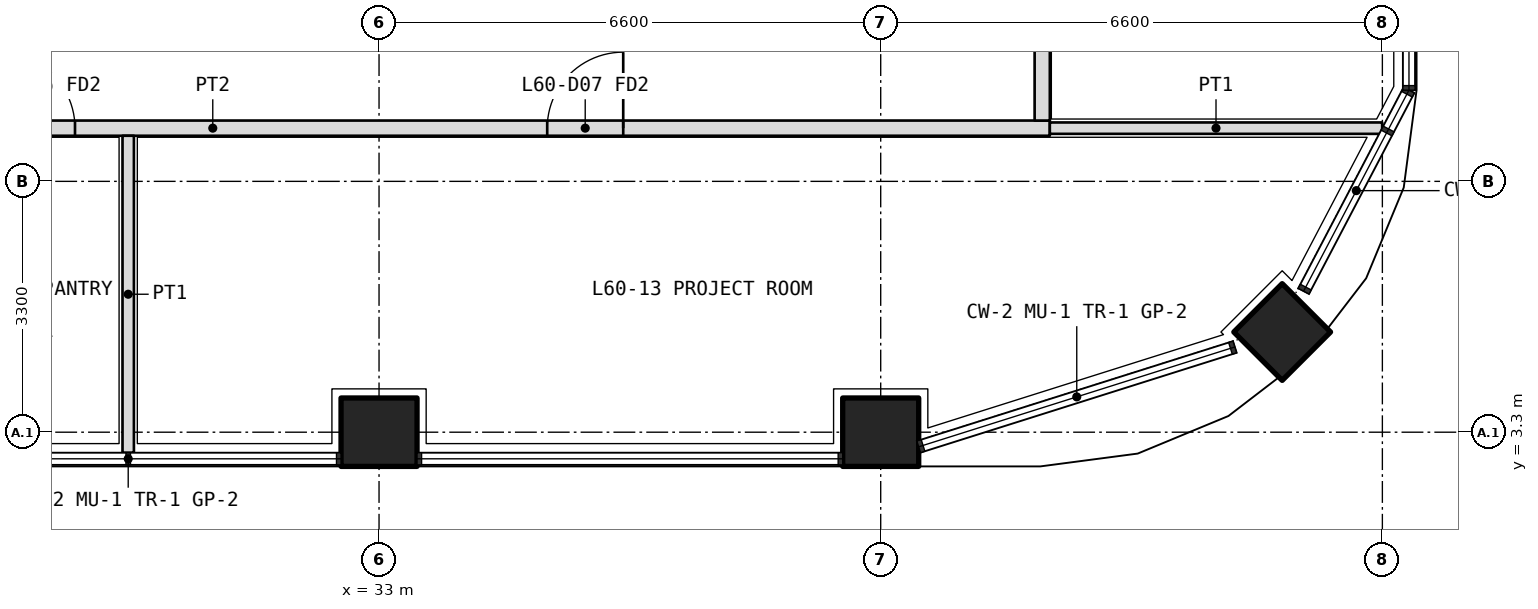
"""IFC4 building model, lengths in metres.
Left out: names, types, materials, properties, quantities, classifications, styles, units other than length and angle.
Written with IfcOpenShell. Run it as: python <this file> out.ifc"""

import sys

from ifc_helpers import new_model, si_unit, direction, frame, frame_2d, origin, origin_2d, place, context, subcontext, project, spatial, rectangle, extrude, element, fill, save


model = new_model("IFC4")
c1 = context("Model", 3, precision=1e-05, world=origin(), true_north=direction((0.0, 1.0)))
c2 = subcontext(c1, "Body", "Model", "MODEL_VIEW")
j1 = project(units=[si_unit("LENGTHUNIT", "METRE"), si_unit("PLANEANGLEUNIT", "RADIAN")], contexts=[c1])
p1 = place(None, origin())
s1 = spatial("IfcSite", under=j1, at=p1, CompositionType="ELEMENT")
p2 = place(p1, origin())
s2 = spatial("IfcBuilding", under=s1, at=p2, CompositionType="ELEMENT")
p3 = place(p2, frame((0.0, 0.0, 262.8)))
s3 = spatial("IfcBuildingStorey", under=s2, at=p3, CompositionType="ELEMENT", Elevation=262.8)
p4 = place(p3, frame((44.882, 4.618, 0.0), z_axis=(0.0, 0.0, 1.0), x_axis=(0.707106781187, 0.707106781187, 0.0)))
e1 = element("IfcColumn", 1, at=p4, inside=s3, PredefinedType="COLUMN", context=c2, shape_type="SweptSolid", body=[
    extrude(rectangle(XDim=0.9, YDim=0.9, at=origin_2d()), origin(), (0.0, 0.0, 1.0), 4.2),
])
for number, where, z_axis, x_axis in (
    (2, (33.0, 3.3, 0.0), (0.0, 0.0, 1.0), (1.0, 0.0, 0.0)),
    (3, (39.6, 3.3, 0.0), (0.0, 0.0, 1.0), (1.0, 0.0, 0.0)),
):
    element("IfcColumn", number, at=place(p3, frame(where, z_axis=z_axis, x_axis=x_axis)), inside=s3, PredefinedType="COLUMN", context=c2, shape_type="SweptSolid", body=[
        extrude(rectangle(XDim=1.0, YDim=0.9, at=origin_2d()), origin(), (0.0, 0.0, 1.0), 4.2),
    ])
p5 = place(p3, frame((19.8, 7.3, 0.0), z_axis=(0.0, 0.0, 1.0), x_axis=(1.0, 0.0, 0.0)))
e4 = element("IfcWall", 4, at=p5, inside=s3, PredefinedType="PARTITIONING", context=c2, shape_type="SweptSolid", body=[
    extrude(rectangle(XDim=22.025, YDim=0.2, at=frame_2d((11.012, 0.0))), origin(), (0.0, 0.0, 1.0), 3.0),
])
p6 = place(p5, frame((1.15, 0.0, 0.0)))
e5 = element("IfcOpeningElement", 5, at=p6, cuts=e4, PredefinedType="OPENING", context=c2, shape_type="SweptSolid", body=[
    extrude(rectangle(XDim=1.0, YDim=2.1, at=frame_2d((0.5, 1.05))), frame((0.0, 0.11, 0.0), z_axis=(0.0, -1.0, 0.0), x_axis=(1.0, 0.0, 0.0)), (0.0, 0.0, 1.0), 0.22),
])
p7 = place(p5, frame((4.9, 0.0, 0.0)))
e6 = element("IfcOpeningElement", 6, at=p7, cuts=e4, PredefinedType="OPENING", context=c2, shape_type="SweptSolid", body=[
    extrude(rectangle(XDim=1.0, YDim=2.1, at=frame_2d((0.5, 1.05))), frame((0.0, 0.11, 0.0), z_axis=(0.0, -1.0, 0.0), x_axis=(1.0, 0.0, 0.0)), (0.0, 0.0, 1.0), 0.22),
])
p8 = place(p5, frame((8.2, 0.0, 0.0)))
e7 = element("IfcOpeningElement", 7, at=p8, cuts=e4, PredefinedType="OPENING", context=c2, shape_type="SweptSolid", body=[
    extrude(rectangle(XDim=1.0, YDim=2.1, at=frame_2d((0.5, 1.05))), frame((0.0, 0.11, 0.0), z_axis=(0.0, -1.0, 0.0), x_axis=(1.0, 0.0, 0.0)), (0.0, 0.0, 1.0), 0.22),
])
p9 = place(p5, frame((15.413, 0.0, 0.0)))
e8 = element("IfcOpeningElement", 8, at=p9, cuts=e4, PredefinedType="OPENING", context=c2, shape_type="SweptSolid", body=[
    extrude(rectangle(XDim=1.0, YDim=2.1, at=frame_2d((0.5, 1.05))), frame((0.0, 0.11, 0.0), z_axis=(0.0, -1.0, 0.0), x_axis=(1.0, 0.0, 0.0)), (0.0, 0.0, 1.0), 0.22),
])
p10 = place(p3, frame((41.725, 7.4, 0.0), z_axis=(0.0, 0.0, 1.0), x_axis=(0.0, 1.0, 0.0)))
e9 = element("IfcWall", 9, at=p10, inside=s3, PredefinedType="PARTITIONING", context=c2, shape_type="SweptSolid", body=[
    extrude(rectangle(XDim=31.4, YDim=0.2, at=frame_2d((15.7, 0.0))), origin(), (0.0, 0.0, 1.0), 3.0),
])
p11 = place(p10, frame((5.65, 0.0, 0.0)))
e10 = element("IfcOpeningElement", 10, at=p11, cuts=e9, PredefinedType="OPENING", context=c2, shape_type="SweptSolid", body=[
    extrude(rectangle(XDim=1.0, YDim=2.1, at=frame_2d((0.5, 1.05))), frame((0.0, 0.11, 0.0), z_axis=(0.0, -1.0, 0.0), x_axis=(1.0, 0.0, 0.0)), (0.0, 0.0, 1.0), 0.22),
])
p12 = place(p10, frame((13.4, 0.0, 0.0)))
e11 = element("IfcOpeningElement", 11, at=p12, cuts=e9, PredefinedType="OPENING", context=c2, shape_type="SweptSolid", body=[
    extrude(rectangle(XDim=1.0, YDim=2.1, at=frame_2d((0.5, 1.05))), frame((0.0, 0.11, 0.0), z_axis=(0.0, -1.0, 0.0), x_axis=(1.0, 0.0, 0.0)), (0.0, 0.0, 1.0), 0.22),
])
p13 = place(p10, frame((16.75, 0.0, 0.0)))
e12 = element("IfcOpeningElement", 12, at=p13, cuts=e9, PredefinedType="OPENING", context=c2, shape_type="SweptSolid", body=[
    extrude(rectangle(XDim=0.9, YDim=2.1, at=frame_2d((0.45, 1.05))), frame((0.0, 0.11, 0.0), z_axis=(0.0, -1.0, 0.0), x_axis=(1.0, 0.0, 0.0)), (0.0, 0.0, 1.0), 0.22),
])
p14 = place(p10, frame((24.65, 0.0, 0.0)))
e13 = element("IfcOpeningElement", 13, at=p14, cuts=e9, PredefinedType="OPENING", context=c2, shape_type="SweptSolid", body=[
    extrude(rectangle(XDim=1.2, YDim=2.1, at=frame_2d((0.6, 1.05))), frame((0.0, 0.11, 0.0), z_axis=(0.0, -1.0, 0.0), x_axis=(1.0, 0.0, 0.0)), (0.0, 0.0, 1.0), 0.22),
])
p15 = place(p3, frame((46.198, 7.3, 0.0), z_axis=(0.0, 0.0, 1.0), x_axis=(-1.0, 0.0, 0.0)))
e14 = element("IfcWall", 14, at=p15, inside=s3, PredefinedType="PARTITIONING", context=c2, shape_type="SweptSolid", body=[
    extrude(rectangle(XDim=4.373, YDim=0.15, at=frame_2d((2.186, 0.0))), origin(), (0.0, 0.0, 1.0), 2.7),
])
p16 = place(p3, frame((29.7, 3.03, 0.0), z_axis=(0.0, 0.0, 1.0), x_axis=(0.0, 1.0, 0.0)))
e15 = element("IfcWall", 15, at=p16, inside=s3, PredefinedType="PARTITIONING", context=c2, shape_type="SweptSolid", body=[
    extrude(rectangle(XDim=4.17, YDim=0.15, at=frame_2d((2.085, 0.0))), origin(), (0.0, 0.0, 1.0), 2.7),
])
p17 = place(p8, origin())
e16 = element("IfcDoor", 16, at=p17, inside=s3, OperationType="SINGLE_SWING_LEFT", PredefinedType="DOOR", context=c2, shape_type="SweptSolid", body=[
    extrude(rectangle(XDim=1.0, YDim=2.1, at=frame_2d((0.5, 1.05))), frame((0.0, 0.025, 0.0), z_axis=(0.0, -1.0, 0.0), x_axis=(1.0, 0.0, 0.0)), (0.0, 0.0, 1.0), 0.05),
])
fill(e7, e16)
p18 = place(p9, origin())
e17 = element("IfcDoor", 17, at=p18, inside=s3, OperationType="SINGLE_SWING_RIGHT", PredefinedType="DOOR", context=c2, shape_type="SweptSolid", body=[
    extrude(rectangle(XDim=1.0, YDim=2.1, at=frame_2d((0.5, 1.05))), frame((0.0, 0.025, 0.0), z_axis=(0.0, -1.0, 0.0), x_axis=(1.0, 0.0, 0.0)), (0.0, 0.0, 1.0), 0.05),
])
fill(e8, e17)
save(model, sys.argv[1])
